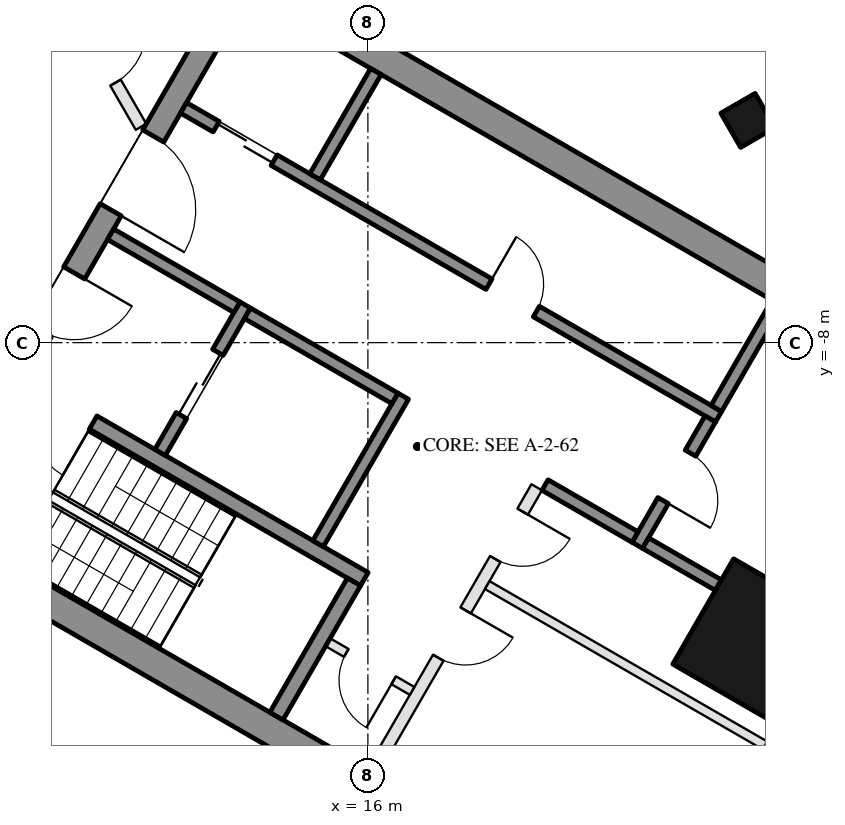
"""IFC4 building model, lengths in metres.
Left out: names, types, materials, properties, quantities, classifications, styles, units other than length and angle.
Written with IfcOpenShell. Run it as: python <this file> out.ifc"""

import sys

from ifc_helpers import new_model, si_unit, direction, frame, frame_2d, origin, origin_2d, place, context, subcontext, project, spatial, rectangle, hollow_rectangle, extrude, boolean, halfspace, element, fill, save


model = new_model("IFC4")
c1 = context("Model", 3, precision=1e-05, world=origin(), true_north=direction((0.0, 1.0)))
c2 = subcontext(c1, "Body", "Model", "MODEL_VIEW")
j1 = project(units=[si_unit("LENGTHUNIT", "METRE"), si_unit("PLANEANGLEUNIT", "RADIAN")], contexts=[c1])
p1 = place(None, origin())
s1 = spatial("IfcSite", under=j1, at=p1, CompositionType="ELEMENT")
p2 = place(p1, origin())
s2 = spatial("IfcBuilding", under=s1, at=p2, CompositionType="ELEMENT")
p3 = place(p2, frame((0.0, 0.0, 268.9)))
s3 = spatial("IfcBuildingStorey", under=s2, at=p3, CompositionType="ELEMENT", Elevation=268.9)
p4 = place(p3, frame((22.249, -4.345, 0.0), z_axis=(0.0, 0.0, 1.0), x_axis=(-0.5, 0.866025403784, 0.0)))
e1 = element("IfcColumn", 1, at=p4, inside=s3, PredefinedType="COLUMN", context=c2, shape_type="SweptSolid", body=[
    boolean("DIFFERENCE", extrude(hollow_rectangle(XDim=0.65, YDim=0.65, WallThickness=0.03, at=origin_2d()), origin(), (0.0, 0.0, 1.0), 3.7), halfspace(frame((0.0, 0.0, 0.047), z_axis=(0.0, 0.0, 1.0), x_axis=(1.0, 0.0, 0.0)), True)),
])
p5 = place(p3, frame((22.38, -12.921, 0.0), z_axis=(0.0, 0.0, 1.0), x_axis=(0.5, 0.866025403784, 0.0)))
e2 = element("IfcColumn", 2, at=p5, inside=s3, PredefinedType="COLUMN", context=c2, shape_type="SweptSolid", body=[
    boolean("DIFFERENCE", extrude(hollow_rectangle(XDim=2.0, YDim=2.0, WallThickness=0.05, at=origin_2d()), origin(), (0.0, 0.0, 1.0), 3.7), halfspace(frame((0.0, 0.0, 0.113), z_axis=(0.0, 0.0, 1.0), x_axis=(1.0, 0.0, 0.0)), True)),
])
p6 = place(p3, frame((22.065, -15.817, 0.0), z_axis=(0.0, 0.0, 1.0), x_axis=(0.500025039717, 0.866010946615, 0.0)))
e3 = element("IfcWall", 3, at=p6, inside=s3, PredefinedType="SOLIDWALL", context=c2, shape_type="SweptSolid", body=[
    extrude(rectangle(XDim=5.331, YDim=0.35, at=frame_2d((2.666, 0.0))), origin(), (0.0, 0.0, 1.0), 3.55),
])
p7 = place(p3, frame((24.731, -6.193, 0.0), z_axis=(0.0, 0.0, 1.0), x_axis=(-0.500007749075, 0.866020929808, 0.0)))
e4 = element("IfcWall", 4, at=p7, inside=s3, PredefinedType="SOLIDWALL", context=c2, shape_type="SweptSolid", body=[
    extrude(rectangle(XDim=11.185, YDim=0.35, at=frame_2d((5.593, 0.0))), origin(), (0.0, 0.0, 1.0), 3.55),
])
p8 = place(p7, frame((0.381, 0.0, 0.3)))
e5 = element("IfcOpeningElement", 5, at=p8, cuts=e4, PredefinedType="OPENING", context=c2, shape_type="SweptSolid", body=[
    extrude(rectangle(XDim=1.7, YDim=2.65, at=frame_2d((0.85, 1.325))), frame((0.0, 0.185, 0.0), z_axis=(0.0, -1.0, 0.0), x_axis=(1.0, 0.0, 0.0)), (0.0, 0.0, 1.0), 0.37),
])
p9 = place(p7, frame((7.21, 0.0, 0.0)))
e6 = element("IfcOpeningElement", 6, at=p9, cuts=e4, PredefinedType="OPENING", context=c2, shape_type="SweptSolid", body=[
    extrude(rectangle(XDim=2.4, YDim=2.4, at=frame_2d((1.2, 1.2))), frame((0.0, 0.185, 0.0), z_axis=(0.0, -1.0, 0.0), x_axis=(1.0, 0.0, 0.0)), (0.0, 0.0, 1.0), 0.37),
])
p10 = place(p7, frame((3.517, 0.0, 0.3)))
e7 = element("IfcOpeningElement", 7, at=p10, cuts=e4, PredefinedType="OPENING", context=c2, shape_type="SweptSolid", body=[
    extrude(rectangle(XDim=1.5, YDim=2.65, at=frame_2d((0.75, 1.325))), frame((0.0, 0.185, 0.0), z_axis=(0.0, -1.0, 0.0), x_axis=(1.0, 0.0, 0.0)), (0.0, 0.0, 1.0), 0.37),
])
p11 = place(p7, frame((5.317, 0.0, 0.3)))
e8 = element("IfcOpeningElement", 8, at=p11, cuts=e4, PredefinedType="OPENING", context=c2, shape_type="SweptSolid", body=[
    extrude(rectangle(XDim=1.5, YDim=2.65, at=frame_2d((0.75, 1.325))), frame((0.0, 0.185, 0.0), z_axis=(0.0, -1.0, 0.0), x_axis=(1.0, 0.0, 0.0)), (0.0, 0.0, 1.0), 0.37),
])
for number, where, z_axis, x_axis in (
    (9, (8.547, -10.997, 0.0), (0.0, 0.0, 1.0), (0.866, -0.5, 0.0)),
    (10, (13.797, -1.903, 0.0), (0.0, 0.0, 1.0), (0.866, -0.5, 0.0)),
):
    element("IfcWall", number, at=place(p3, frame(where, z_axis=z_axis, x_axis=x_axis)), inside=s3, PredefinedType="SHEAR", context=c2, shape_type="SweptSolid", body=[
        extrude(rectangle(XDim=13.031, YDim=0.5, at=frame_2d((6.516, 0.0))), origin(), (0.0, 0.0, 1.0), 3.5),
    ])
p12 = place(p3, frame((8.845, -10.88, 0.0), z_axis=(0.0, 0.0, 1.0), x_axis=(0.500004234368, 0.866022959057, 0.0)))
e11 = element("IfcWall", 11, at=p12, inside=s3, PredefinedType="SHEAR", context=c2, shape_type="SweptSolid", body=[
    extrude(rectangle(XDim=10.0, YDim=0.4, at=frame_2d((5.0, 0.0))), origin(), (0.0, 0.0, 1.0), 3.5),
])
p13 = place(p12, frame((3.55, 0.0, 0.0)))
e12 = element("IfcOpeningElement", 12, at=p13, cuts=e11, PredefinedType="OPENING", context=c2, shape_type="SweptSolid", body=[
    extrude(rectangle(XDim=1.1, YDim=2.1, at=frame_2d((0.55, 1.05))), frame((0.0, 0.21, 0.0), z_axis=(0.0, -1.0, 0.0), x_axis=(1.0, 0.0, 0.0)), (0.0, 0.0, 1.0), 0.42),
])
p14 = place(p12, frame((5.85, 0.0, 0.0)))
e13 = element("IfcOpeningElement", 13, at=p14, cuts=e11, PredefinedType="OPENING", context=c2, shape_type="SweptSolid", body=[
    extrude(rectangle(XDim=1.4, YDim=2.1, at=frame_2d((0.7, 1.05))), frame((0.0, 0.21, 0.0), z_axis=(0.0, -1.0, 0.0), x_axis=(1.0, 0.0, 0.0)), (0.0, 0.0, 1.0), 0.42),
])
p15 = place(p3, frame((10.356, -8.664, 0.0), z_axis=(0.0, 0.0, 1.0), x_axis=(0.866028629588, -0.499994412703, 0.0)))
e14 = element("IfcWall", 14, at=p15, inside=s3, PredefinedType="SHEAR", context=c2, shape_type="SweptSolid", body=[
    extrude(rectangle(XDim=6.45, YDim=0.25, at=frame_2d((3.225, 0.0))), origin(), (0.0, 0.0, 1.0), 3.5),
])
p16 = place(p15, frame((0.3, 0.0, 0.0)))
e15 = element("IfcOpeningElement", 15, at=p16, cuts=e14, PredefinedType="OPENING", context=c2, shape_type="SweptSolid", body=[
    extrude(rectangle(XDim=1.0, YDim=2.1, at=frame_2d((0.5, 1.05))), frame((0.0, 0.135, 0.0), z_axis=(0.0, -1.0, 0.0), x_axis=(1.0, 0.0, 0.0)), (0.0, 0.0, 1.0), 0.27),
])
p17 = place(p3, frame((14.496, -14.143, 0.0), z_axis=(0.0, 0.0, 1.0), x_axis=(0.500062241894, 0.865989465428, 0.0)))
e16 = element("IfcWall", 16, at=p17, inside=s3, PredefinedType="SHEAR", context=c2, shape_type="SweptSolid", body=[
    extrude(rectangle(XDim=2.55, YDim=0.25, at=frame_2d((1.275, 0.0))), origin(), (0.0, 0.0, 1.0), 3.5),
])
p18 = place(p3, frame((15.181, -11.305, 0.0), z_axis=(0.0, 0.0, 1.0), x_axis=(0.49994636267, 0.866056369097, 0.0)))
e17 = element("IfcWall", 17, at=p18, inside=s3, PredefinedType="SHEAR", context=c2, shape_type="SweptSolid", body=[
    extrude(rectangle(XDim=2.8, YDim=0.2, at=frame_2d((1.4, 0.0))), origin(), (0.0, 0.0, 1.0), 3.5),
])
p19 = place(p3, frame((12.583, -9.805, 0.0), z_axis=(0.0, 0.0, 1.0), x_axis=(0.49994636267, 0.866056369097, 0.0)))
e18 = element("IfcWall", 18, at=p19, inside=s3, PredefinedType="SHEAR", context=c2, shape_type="SweptSolid", body=[
    extrude(rectangle(XDim=2.8, YDim=0.2, at=frame_2d((1.4, 0.0))), origin(), (0.0, 0.0, 1.0), 3.5),
])
p20 = place(p19, frame((0.7, 0.0, 0.0)))
e19 = element("IfcOpeningElement", 19, at=p20, cuts=e18, PredefinedType="OPENING", context=c2, shape_type="SweptSolid", body=[
    extrude(rectangle(XDim=1.2, YDim=2.1, at=frame_2d((0.6, 1.05))), frame((0.0, 0.11, 0.0), z_axis=(0.0, -1.0, 0.0), x_axis=(1.0, 0.0, 0.0)), (0.0, 0.0, 1.0), 0.22),
])
p21 = place(p3, frame((11.768, -6.217, 0.0), z_axis=(0.0, 0.0, 1.0), x_axis=(0.866050077142, -0.499957262057, 0.0)))
e20 = element("IfcWall", 20, at=p21, inside=s3, PredefinedType="SHEAR", context=c2, shape_type="SweptSolid", body=[
    extrude(rectangle(XDim=2.4, YDim=0.2, at=frame_2d((1.2, 0.0))), origin(), (0.0, 0.0, 1.0), 3.5),
])
p22 = place(p3, frame((14.02, -7.517, 0.0), z_axis=(0.0, 0.0, 1.0), x_axis=(0.866034573852, -0.49998411664, 0.0)))
e21 = element("IfcWall", 21, at=p22, inside=s3, PredefinedType="SHEAR", context=c2, shape_type="SweptSolid", body=[
    extrude(rectangle(XDim=2.8, YDim=0.2, at=frame_2d((1.4, 0.0))), origin(), (0.0, 0.0, 1.0), 3.5),
])
p23 = place(p3, frame((12.968, -4.138, 0.0), z_axis=(0.0, 0.0, 1.0), x_axis=(0.866028328073, -0.49999493495, 0.0)))
e22 = element("IfcWall", 22, at=p23, inside=s3, PredefinedType="SHEAR", context=c2, shape_type="SweptSolid", body=[
    extrude(rectangle(XDim=10.16, YDim=0.2, at=frame_2d((5.08, 0.0))), origin(), (0.0, 0.0, 1.0), 3.5),
])
p24 = place(p23, frame((0.62, 0.0, 0.0)))
e23 = element("IfcOpeningElement", 23, at=p24, cuts=e22, PredefinedType="OPENING", context=c2, shape_type="SweptSolid", body=[
    extrude(rectangle(XDim=1.1, YDim=2.1, at=frame_2d((0.55, 1.05))), frame((0.0, 0.11, 0.0), z_axis=(0.0, -1.0, 0.0), x_axis=(1.0, 0.0, 0.0)), (0.0, 0.0, 1.0), 0.22),
])
p25 = place(p23, frame((5.8, 0.0, 0.0)))
e24 = element("IfcOpeningElement", 24, at=p25, cuts=e22, PredefinedType="OPENING", context=c2, shape_type="SweptSolid", body=[
    extrude(rectangle(XDim=0.9, YDim=2.1, at=frame_2d((0.45, 1.05))), frame((0.0, 0.11, 0.0), z_axis=(0.0, -1.0, 0.0), x_axis=(1.0, 0.0, 0.0)), (0.0, 0.0, 1.0), 0.22),
])
p26 = place(p3, frame((20.43, -11.333, 0.0), z_axis=(0.0, 0.0, 1.0), x_axis=(0.500001309137, 0.866024647952, 0.0)))
e25 = element("IfcWall", 25, at=p26, inside=s3, PredefinedType="SHEAR", context=c2, shape_type="SweptSolid", body=[
    extrude(rectangle(XDim=2.4, YDim=0.2, at=frame_2d((1.2, 0.0))), origin(), (0.0, 0.0, 1.0), 3.5),
])
p27 = place(p26, frame((0.85, 0.0, 0.0)))
e26 = element("IfcOpeningElement", 26, at=p27, cuts=e25, PredefinedType="OPENING", context=c2, shape_type="SweptSolid", body=[
    extrude(rectangle(XDim=0.9, YDim=2.1, at=frame_2d((0.45, 1.05))), frame((0.0, 0.11, 0.0), z_axis=(0.0, -1.0, 0.0), x_axis=(1.0, 0.0, 0.0)), (0.0, 0.0, 1.0), 0.22),
])
p28 = place(p3, frame((18.913, -10.342, 0.0), z_axis=(0.0, 0.0, 1.0), x_axis=(0.866038183914, -0.499977863513, 0.0)))
e27 = element("IfcWall", 27, at=p28, inside=s3, PredefinedType="SHEAR", context=c2, shape_type="SweptSolid", body=[
    extrude(rectangle(XDim=1.71, YDim=0.2, at=frame_2d((0.855, 0.0))), origin(), (0.0, 0.0, 1.0), 3.5),
])
for number, where, z_axis, x_axis in (
    (28, (15.131, -5.272, 0.0), (0.0, 0.0, 1.0), (0.5, 0.866, 0.0)),
    (29, (21.73, -9.082, 0.0), (0.0, 0.0, 1.0), (0.5, 0.866, 0.0)),
):
    element("IfcWall", number, at=place(p3, frame(where, z_axis=z_axis, x_axis=x_axis)), inside=s3, PredefinedType="SHEAR", context=c2, shape_type="SweptSolid", body=[
        extrude(rectangle(XDim=2.0, YDim=0.2, at=frame_2d((1.0, 0.0))), origin(), (0.0, 0.0, 1.0), 3.5),
    ])
p29 = place(p3, frame((20.567, -11.297, 0.0), z_axis=(0.0, 0.0, 1.0), x_axis=(0.866094443108, -0.499880401313, 0.0)))
e30 = element("IfcWall", 30, at=p29, inside=s3, PredefinedType="SHEAR", context=c2, shape_type="SweptSolid", body=[
    extrude(rectangle(XDim=1.383, YDim=0.2, at=frame_2d((0.691, 0.0))), origin(), (0.0, 0.0, 1.0), 3.5),
])
p30 = place(p3, frame((16.076, -15.055, 0.0), z_axis=(0.0, 0.0, 1.0), x_axis=(0.499995103361, 0.866028230842, 0.0)))
e31 = element("IfcWall", 31, at=p30, inside=s3, PredefinedType="PARTITIONING", context=c2, shape_type="SweptSolid", body=[
    extrude(rectangle(XDim=5.4, YDim=0.2, at=frame_2d((2.7, 0.0))), origin(), (0.0, 0.0, 1.0), 3.5),
])
p31 = place(p30, frame((2.163, 0.0, 0.0)))
e32 = element("IfcOpeningElement", 32, at=p31, cuts=e31, PredefinedType="OPENING", context=c2, shape_type="SweptSolid", body=[
    extrude(rectangle(XDim=0.9, YDim=2.1, at=frame_2d((0.45, 1.05))), frame((0.0, 0.11, 0.0), z_axis=(0.0, -1.0, 0.0), x_axis=(1.0, 0.0, 0.0)), (0.0, 0.0, 1.0), 0.22),
])
p32 = place(p30, frame((4.038, 0.0, 0.0)))
e33 = element("IfcOpeningElement", 33, at=p32, cuts=e31, PredefinedType="OPENING", context=c2, shape_type="SweptSolid", body=[
    extrude(rectangle(XDim=0.9, YDim=2.1, at=frame_2d((0.45, 1.05))), frame((0.0, 0.11, 0.0), z_axis=(0.0, -1.0, 0.0), x_axis=(1.0, 0.0, 0.0)), (0.0, 0.0, 1.0), 0.22),
])
p33 = place(p3, frame((15.342, -12.928, 0.0), z_axis=(0.0, 0.0, 1.0), x_axis=(0.865989903783, -0.500061482766, 0.0)))
e34 = element("IfcWall", 34, at=p33, inside=s3, PredefinedType="PARTITIONING", context=c2, shape_type="SweptSolid", body=[
    extrude(rectangle(XDim=1.6, YDim=0.15, at=frame_2d((0.8, 0.0))), origin(), (0.0, 0.0, 1.0), 3.5),
])
p34 = place(p33, frame((0.35, 0.0, 0.0)))
e35 = element("IfcOpeningElement", 35, at=p34, cuts=e34, PredefinedType="OPENING", context=c2, shape_type="SweptSolid", body=[
    extrude(rectangle(XDim=0.9, YDim=2.1, at=frame_2d((0.45, 1.05))), frame((0.0, 0.085, 0.0), z_axis=(0.0, -1.0, 0.0), x_axis=(1.0, 0.0, 0.0)), (0.0, 0.0, 1.0), 0.17),
])
p35 = place(p3, frame((17.963, -11.987, 0.0), z_axis=(0.0, 0.0, 1.0), x_axis=(0.866008903822, -0.500028577684, 0.0)))
e36 = element("IfcWall", 36, at=p35, inside=s3, PredefinedType="PARTITIONING", context=c2, shape_type="SweptSolid", body=[
    extrude(rectangle(XDim=5.293, YDim=0.15, at=frame_2d((2.646, 0.0))), origin(), (0.0, 0.0, 1.0), 3.5),
])
p36 = place(p3, frame((10.075, -0.65, 0.0), z_axis=(0.0, 0.0, 1.0), x_axis=(0.499998569178, -0.866026229868, 0.0)))
e37 = element("IfcWall", 37, at=p36, inside=s3, PredefinedType="PARTITIONING", context=c2, shape_type="SweptSolid", body=[
    extrude(rectangle(XDim=4.388, YDim=0.2, at=frame_2d((2.194, 0.0))), origin(), (0.0, 0.0, 1.0), 3.0),
])
p37 = place(p36, frame((2.55, 0.0, 0.0)))
e38 = element("IfcOpeningElement", 38, at=p37, cuts=e37, PredefinedType="OPENING", context=c2, shape_type="SweptSolid", body=[
    extrude(rectangle(XDim=1.0, YDim=2.1, at=frame_2d((0.5, 1.05))), frame((0.0, 0.11, 0.0), z_axis=(0.0, -1.0, 0.0), x_axis=(1.0, 0.0, 0.0)), (0.0, 0.0, 1.0), 0.22),
])
p38 = place(p20, origin())
e39 = element("IfcDoor", 39, at=p38, inside=s3, OperationType="DOUBLE_DOOR_SLIDING", PredefinedType="DOOR", context=c2, shape_type="SweptSolid", body=[
    extrude(rectangle(XDim=1.2, YDim=2.1, at=frame_2d((0.6, 1.05))), frame((0.0, 0.025, 0.0), z_axis=(0.0, -1.0, 0.0), x_axis=(1.0, 0.0, 0.0)), (0.0, 0.0, 1.0), 0.05),
])
fill(e19, e39)
p39 = place(p34, frame((0.9, 0.0, 0.0), z_axis=(0.0, 0.0, 1.0), x_axis=(-1.0, 0.0, 0.0)))
e40 = element("IfcDoor", 40, at=p39, inside=s3, OperationType="SINGLE_SWING_LEFT", PredefinedType="DOOR", context=c2, shape_type="SweptSolid", body=[
    extrude(rectangle(XDim=0.9, YDim=2.1, at=frame_2d((0.45, 1.05))), frame((0.0, 0.025, 0.0), z_axis=(0.0, -1.0, 0.0), x_axis=(1.0, 0.0, 0.0)), (0.0, 0.0, 1.0), 0.05),
])
fill(e35, e40)
p40 = place(p24, origin())
e41 = element("IfcDoor", 41, at=p40, inside=s3, OperationType="DOUBLE_DOOR_SLIDING", PredefinedType="DOOR", context=c2, shape_type="SweptSolid", body=[
    extrude(rectangle(XDim=1.1, YDim=2.1, at=frame_2d((0.55, 1.05))), frame((0.0, 0.025, 0.0), z_axis=(0.0, -1.0, 0.0), x_axis=(1.0, 0.0, 0.0)), (0.0, 0.0, 1.0), 0.05),
])
fill(e23, e41)
p41 = place(p25, origin())
e42 = element("IfcDoor", 42, at=p41, inside=s3, OperationType="SINGLE_SWING_LEFT", PredefinedType="DOOR", context=c2, shape_type="SweptSolid", body=[
    extrude(rectangle(XDim=0.9, YDim=2.1, at=frame_2d((0.45, 1.05))), frame((0.0, 0.025, 0.0), z_axis=(0.0, -1.0, 0.0), x_axis=(1.0, 0.0, 0.0)), (0.0, 0.0, 1.0), 0.05),
])
fill(e24, e42)
p42 = place(p27, frame((0.9, 0.0, 0.0), z_axis=(0.0, 0.0, 1.0), x_axis=(-1.0, 0.0, 0.0)))
e43 = element("IfcDoor", 43, at=p42, inside=s3, OperationType="SINGLE_SWING_RIGHT", PredefinedType="DOOR", context=c2, shape_type="SweptSolid", body=[
    extrude(rectangle(XDim=0.9, YDim=2.1, at=frame_2d((0.45, 1.05))), frame((0.0, 0.025, 0.0), z_axis=(0.0, -1.0, 0.0), x_axis=(1.0, 0.0, 0.0)), (0.0, 0.0, 1.0), 0.05),
])
fill(e26, e43)
p43 = place(p31, frame((0.9, 0.0, 0.0), z_axis=(0.0, 0.0, 1.0), x_axis=(-1.0, 0.0, 0.0)))
e44 = element("IfcDoor", 44, at=p43, inside=s3, OperationType="SINGLE_SWING_LEFT", PredefinedType="DOOR", context=c2, shape_type="SweptSolid", body=[
    extrude(rectangle(XDim=0.9, YDim=2.1, at=frame_2d((0.45, 1.05))), frame((0.0, 0.025, 0.0), z_axis=(0.0, -1.0, 0.0), x_axis=(1.0, 0.0, 0.0)), (0.0, 0.0, 1.0), 0.05),
])
fill(e32, e44)
p44 = place(p32, frame((0.9, 0.0, 0.0), z_axis=(0.0, 0.0, 1.0), x_axis=(-1.0, 0.0, 0.0)))
e45 = element("IfcDoor", 45, at=p44, inside=s3, OperationType="SINGLE_SWING_LEFT", PredefinedType="DOOR", context=c2, shape_type="SweptSolid", body=[
    extrude(rectangle(XDim=0.9, YDim=2.1, at=frame_2d((0.45, 1.05))), frame((0.0, 0.025, 0.0), z_axis=(0.0, -1.0, 0.0), x_axis=(1.0, 0.0, 0.0)), (0.0, 0.0, 1.0), 0.05),
])
fill(e33, e45)
p45 = place(p13, frame((1.1, 0.0, 0.0), z_axis=(0.0, 0.0, 1.0), x_axis=(-1.0, 0.0, 0.0)))
e46 = element("IfcDoor", 46, at=p45, inside=s3, OperationType="SINGLE_SWING_LEFT", PredefinedType="DOOR", context=c2, shape_type="SweptSolid", body=[
    extrude(rectangle(XDim=1.1, YDim=2.1, at=frame_2d((0.55, 1.05))), frame((0.0, 0.025, 0.0), z_axis=(0.0, -1.0, 0.0), x_axis=(1.0, 0.0, 0.0)), (0.0, 0.0, 1.0), 0.05),
])
fill(e12, e46)
p46 = place(p14, frame((1.4, 0.0, 0.0), z_axis=(0.0, 0.0, 1.0), x_axis=(-1.0, 0.0, 0.0)))
e47 = element("IfcDoor", 47, at=p46, inside=s3, OperationType="DOUBLE_DOOR_SINGLE_SWING", PredefinedType="DOOR", context=c2, shape_type="SweptSolid", body=[
    extrude(rectangle(XDim=1.4, YDim=2.1, at=frame_2d((0.7, 1.05))), frame((0.0, 0.025, 0.0), z_axis=(0.0, -1.0, 0.0), x_axis=(1.0, 0.0, 0.0)), (0.0, 0.0, 1.0), 0.05),
])
fill(e13, e47)
p47 = place(p16, frame((1.0, 0.0, 0.0), z_axis=(0.0, 0.0, 1.0), x_axis=(-1.0, 0.0, 0.0)))
e48 = element("IfcDoor", 48, at=p47, inside=s3, OperationType="SINGLE_SWING_LEFT", PredefinedType="DOOR", context=c2, shape_type="SweptSolid", body=[
    extrude(rectangle(XDim=1.0, YDim=2.1, at=frame_2d((0.5, 1.05))), frame((0.0, 0.025, 0.0), z_axis=(0.0, -1.0, 0.0), x_axis=(1.0, 0.0, 0.0)), (0.0, 0.0, 1.0), 0.05),
])
fill(e15, e48)
p48 = place(p37, origin())
e49 = element("IfcDoor", 49, at=p48, inside=s3, OperationType="SINGLE_SWING_LEFT", PredefinedType="DOOR", context=c2, shape_type="SweptSolid", body=[
    extrude(rectangle(XDim=1.0, YDim=2.1, at=frame_2d((0.5, 1.05))), frame((0.0, 0.025, 0.0), z_axis=(0.0, -1.0, 0.0), x_axis=(1.0, 0.0, 0.0)), (0.0, 0.0, 1.0), 0.05),
])
fill(e38, e49)
save(model, sys.argv[1])
